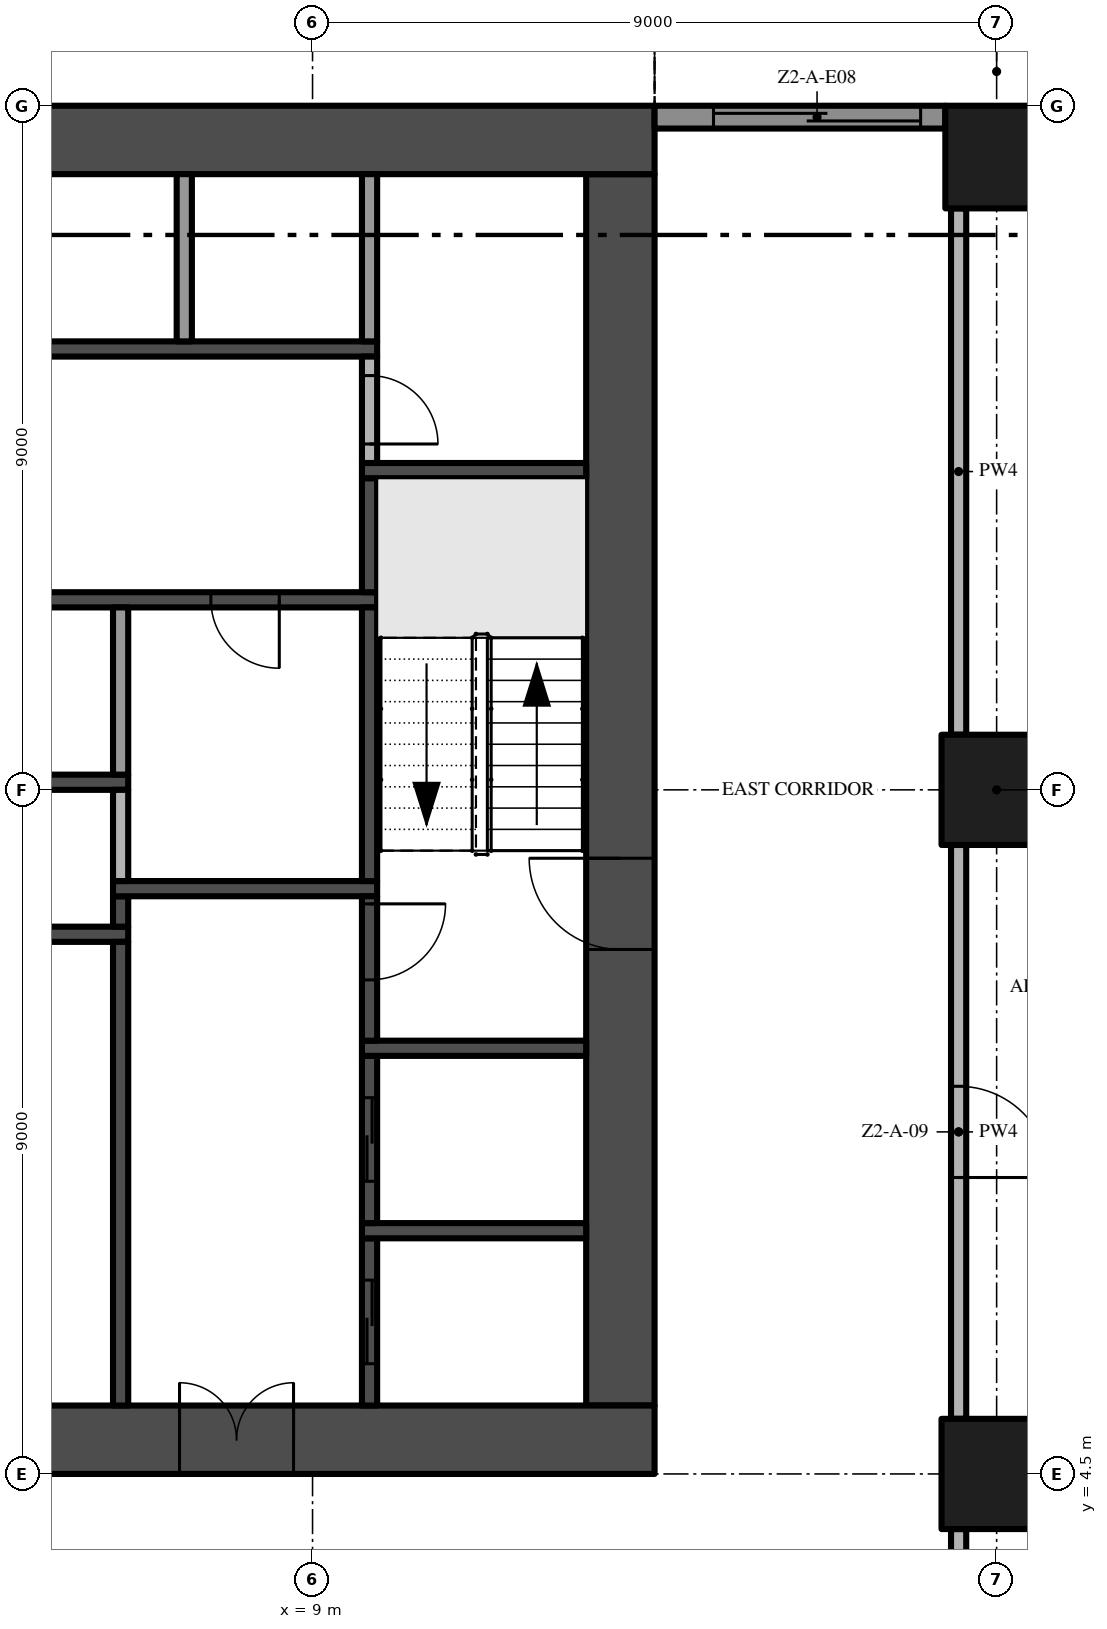
"""IFC4 building model, lengths in metres.
Left out: names, types, materials, properties, quantities, classifications, styles, units other than length and angle.
Written with IfcOpenShell. Run it as: python <this file> out.ifc"""

import sys

from ifc_helpers import new_model, si_unit, direction, frame, frame_2d, origin, origin_2d, place, context, subcontext, project, spatial, polyline, rectangle, outline, extrude, element, fill, save


model = new_model("IFC4")
c1 = context("Model", 3, precision=1e-05, world=origin(), true_north=direction((0.0, 1.0)))
c2 = subcontext(c1, "Body", "Model", "MODEL_VIEW")
j1 = project(units=[si_unit("LENGTHUNIT", "METRE"), si_unit("PLANEANGLEUNIT", "RADIAN")], contexts=[c1])
p1 = place(None, origin())
s1 = spatial("IfcSite", under=j1, at=p1, CompositionType="ELEMENT")
p2 = place(p1, origin())
s2 = spatial("IfcBuilding", under=s1, at=p2, CompositionType="ELEMENT")
p3 = place(p2, frame((0.0, 0.0, 69.4)))
s3 = spatial("IfcBuildingStorey", under=s2, at=p3, CompositionType="ELEMENT", Elevation=69.4)
p4 = place(p3, frame((-13.5, 4.95, -0.3), z_axis=(0.0, 0.0, 1.0), x_axis=(1.0, 0.0, 0.0)))
e1 = element("IfcWall", 1, at=p4, inside=s3, PredefinedType="SHEAR", context=c2, shape_type="SweptSolid", body=[
    extrude(rectangle(XDim=27.0, YDim=0.9, at=frame_2d((13.5, 0.0))), origin(), (0.0, 0.0, 1.0), 3.8),
])
p5 = place(p4, frame((12.0, 0.0, 0.3)))
e2 = element("IfcOpeningElement", 2, at=p5, cuts=e1, PredefinedType="OPENING", context=c2, shape_type="SweptSolid", body=[
    extrude(rectangle(XDim=3.0, YDim=2.4, at=frame_2d((1.5, 1.2))), frame((0.0, 0.46, 0.0), z_axis=(0.0, -1.0, 0.0), x_axis=(1.0, 0.0, 0.0)), (0.0, 0.0, 1.0), 0.92),
])
p6 = place(p4, frame((4.9, 0.0, 0.3)))
e3 = element("IfcOpeningElement", 3, at=p6, cuts=e1, PredefinedType="OPENING", context=c2, shape_type="SweptSolid", body=[
    extrude(rectangle(XDim=1.2, YDim=2.2, at=frame_2d((0.6, 1.1))), frame((0.0, 0.46, 0.0), z_axis=(0.0, -1.0, 0.0), x_axis=(1.0, 0.0, 0.0)), (0.0, 0.0, 1.0), 0.92),
])
p7 = place(p4, frame((20.75, 0.0, 0.3)))
e4 = element("IfcOpeningElement", 4, at=p7, cuts=e1, PredefinedType="OPENING", context=c2, shape_type="SweptSolid", body=[
    extrude(rectangle(XDim=1.5, YDim=2.2, at=frame_2d((0.75, 1.1))), frame((0.0, 0.46, 0.0), z_axis=(0.0, -1.0, 0.0), x_axis=(1.0, 0.0, 0.0)), (0.0, 0.0, 1.0), 0.92),
])
p8 = place(p4, frame((17.4, 0.0, 0.3)))
e5 = element("IfcOpeningElement", 5, at=p8, cuts=e1, PredefinedType="OPENING", context=c2, shape_type="SweptSolid", body=[
    extrude(rectangle(XDim=1.2, YDim=2.2, at=frame_2d((0.6, 1.1))), frame((0.0, 0.46, 0.0), z_axis=(0.0, -1.0, 0.0), x_axis=(1.0, 0.0, 0.0)), (0.0, 0.0, 1.0), 0.92),
])
p9 = place(p3, frame((13.05, 5.4, -0.3), z_axis=(0.0, 0.0, 1.0), x_axis=(0.0, 1.0, 0.0)))
e6 = element("IfcWall", 6, at=p9, inside=s3, PredefinedType="SHEAR", context=c2, shape_type="SweptSolid", body=[
    extrude(rectangle(XDim=16.2, YDim=0.9, at=frame_2d((8.1, 0.0))), origin(), (0.0, 0.0, 1.0), 3.8),
])
p10 = place(p9, frame((6.0, 0.0, 0.3)))
e7 = element("IfcOpeningElement", 7, at=p10, cuts=e6, PredefinedType="OPENING", context=c2, shape_type="SweptSolid", body=[
    extrude(rectangle(XDim=1.2, YDim=2.2, at=frame_2d((0.6, 1.1))), frame((0.0, 0.46, 0.0), z_axis=(0.0, -1.0, 0.0), x_axis=(1.0, 0.0, 0.0)), (0.0, 0.0, 1.0), 0.92),
])
p11 = place(p3, frame((13.5, 22.05, -0.3), z_axis=(0.0, 0.0, 1.0), x_axis=(-1.0, 0.0, 0.0)))
e8 = element("IfcWall", 8, at=p11, inside=s3, PredefinedType="SHEAR", context=c2, shape_type="SweptSolid", body=[
    extrude(rectangle(XDim=27.0, YDim=0.9, at=frame_2d((13.5, 0.0))), origin(), (0.0, 0.0, 1.0), 3.8),
])
p12 = place(p3, frame((18.0, 13.5, 0.0), z_axis=(0.0, 0.0, 1.0), x_axis=(1.0, 0.0, 0.0)))
e9 = element("IfcColumn", 9, at=p12, inside=s3, PredefinedType="COLUMN", context=c2, shape_type="SweptSolid", body=[
    extrude(rectangle(XDim=1.45, YDim=1.45, at=origin_2d()), origin(), (0.0, 0.0, 1.0), 3.5),
])
p13 = place(p3, frame((18.0, 21.825, 0.0), z_axis=(0.0, 0.0, 1.0), x_axis=(1.0, 0.0, 0.0)))
e10 = element("IfcColumn", 10, at=p13, inside=s3, PredefinedType="COLUMN", context=c2, shape_type="SweptSolid", body=[
    extrude(rectangle(XDim=1.35, YDim=1.35, at=origin_2d()), origin(), (0.0, 0.0, 1.0), 3.5),
])
p14 = place(p3, frame((18.0, 4.5, 0.0), z_axis=(0.0, 0.0, 1.0), x_axis=(1.0, 0.0, 0.0)))
e11 = element("IfcColumn", 11, at=p14, inside=s3, PredefinedType="COLUMN", context=c2, shape_type="SweptSolid", body=[
    extrude(rectangle(XDim=1.45, YDim=1.45, at=origin_2d()), origin(), (0.0, 0.0, 1.0), 3.5),
])
p15 = place(p3, frame((13.5, 22.35, 0.0), z_axis=(0.0, 0.0, 1.0), x_axis=(1.0, 0.0, 0.0)))
e12 = element("IfcWall", 12, at=p15, inside=s3, PredefinedType="SOLIDWALL", context=c2, shape_type="SweptSolid", body=[
    extrude(rectangle(XDim=3.825, YDim=0.3, at=frame_2d((1.913, 0.0))), origin(), (0.0, 0.0, 1.0), 3.5),
])
p16 = place(p15, frame((0.775, 0.0, 0.0)))
e13 = element("IfcOpeningElement", 13, at=p16, cuts=e12, PredefinedType="OPENING", context=c2, shape_type="SweptSolid", body=[
    extrude(rectangle(XDim=2.725, YDim=2.4, at=frame_2d((1.363, 1.2))), frame((0.0, 0.16, 0.0), z_axis=(0.0, -1.0, 0.0), x_axis=(1.0, 0.0, 0.0)), (0.0, 0.0, 1.0), 0.32),
])
p17 = place(p3, origin())
e14 = element("IfcWall", 14, at=p17, inside=s3, PredefinedType="USERDEFINED", context=c2, shape_type="SweptSolid", body=[
    extrude(outline(polyline([(22.5, 23.1), (21.0, 23.329), (19.5, 23.929), (18.0, 24.671), (16.5, 25.271), (15.0, 25.5), (13.5, 25.271), (13.538, 25.024), (15.0, 25.247), (16.434, 25.028), (17.898, 24.442), (19.398, 23.701), (20.934, 23.086), (22.462, 22.853), (22.5, 23.1)])), origin(), (0.0, 0.0, 1.0), 0.9),
])
p18 = place(p3, frame((-9.85, 19.3, 0.0), z_axis=(0.0, 0.0, 1.0), x_axis=(1.0, 0.0, 0.0)))
e15 = element("IfcWall", 15, at=p18, inside=s3, PredefinedType="SHEAR", context=c2, shape_type="SweptSolid", body=[
    extrude(rectangle(XDim=19.7, YDim=0.2, at=frame_2d((9.85, 0.0))), origin(), (0.0, 0.0, 1.0), 3.5),
])
p19 = place(p18, frame((0.769, 0.0, 0.0)))
e16 = element("IfcOpeningElement", 16, at=p19, cuts=e15, PredefinedType="OPENING", context=c2, shape_type="SweptSolid", body=[
    extrude(rectangle(XDim=1.1, YDim=2.1, at=frame_2d((0.55, 1.05))), frame((0.0, 0.11, 0.0), z_axis=(0.0, -1.0, 0.0), x_axis=(1.0, 0.0, 0.0)), (0.0, 0.0, 1.0), 0.22),
])
p20 = place(p18, frame((3.206, 0.0, 0.0)))
e17 = element("IfcOpeningElement", 17, at=p20, cuts=e15, PredefinedType="OPENING", context=c2, shape_type="SweptSolid", body=[
    extrude(rectangle(XDim=1.1, YDim=2.1, at=frame_2d((0.55, 1.05))), frame((0.0, 0.11, 0.0), z_axis=(0.0, -1.0, 0.0), x_axis=(1.0, 0.0, 0.0)), (0.0, 0.0, 1.0), 0.22),
])
p21 = place(p18, frame((5.644, 0.0, 0.0)))
e18 = element("IfcOpeningElement", 18, at=p21, cuts=e15, PredefinedType="OPENING", context=c2, shape_type="SweptSolid", body=[
    extrude(rectangle(XDim=1.1, YDim=2.1, at=frame_2d((0.55, 1.05))), frame((0.0, 0.11, 0.0), z_axis=(0.0, -1.0, 0.0), x_axis=(1.0, 0.0, 0.0)), (0.0, 0.0, 1.0), 0.22),
])
p22 = place(p18, frame((8.081, 0.0, 0.0)))
e19 = element("IfcOpeningElement", 19, at=p22, cuts=e15, PredefinedType="OPENING", context=c2, shape_type="SweptSolid", body=[
    extrude(rectangle(XDim=1.1, YDim=2.1, at=frame_2d((0.55, 1.05))), frame((0.0, 0.11, 0.0), z_axis=(0.0, -1.0, 0.0), x_axis=(1.0, 0.0, 0.0)), (0.0, 0.0, 1.0), 0.22),
])
for number, where, z_axis, x_axis in (
    (20, (1.5, 11.6, 0.0), (0.0, 0.0, 1.0), (1.0, 0.0, 0.0)),
    (21, (1.5, 13.6, 0.0), (0.0, 0.0, 1.0), (1.0, 0.0, 0.0)),
):
    element("IfcWall", number, at=place(p3, frame(where, z_axis=z_axis, x_axis=x_axis)), inside=s3, PredefinedType="SHEAR", context=c2, shape_type="SweptSolid", body=[
        extrude(rectangle(XDim=5.075, YDim=0.2, at=frame_2d((2.538, 0.0))), origin(), (0.0, 0.0, 1.0), 3.5),
    ])
p23 = place(p3, frame((9.85, 16.0, 0.0), z_axis=(0.0, 0.0, 1.0), x_axis=(-1.0, 0.0, 0.0)))
e22 = element("IfcWall", 22, at=p23, inside=s3, PredefinedType="SHEAR", context=c2, shape_type="SweptSolid", body=[
    extrude(rectangle(XDim=8.35, YDim=0.2, at=frame_2d((4.175, 0.0))), origin(), (0.0, 0.0, 1.0), 3.5),
])
p24 = place(p23, frame((1.288, 0.0, 0.0)))
e23 = element("IfcOpeningElement", 23, at=p24, cuts=e22, PredefinedType="OPENING", context=c2, shape_type="SweptSolid", body=[
    extrude(rectangle(XDim=0.9, YDim=2.1, at=frame_2d((0.45, 1.05))), frame((0.0, 0.11, 0.0), z_axis=(0.0, -1.0, 0.0), x_axis=(1.0, 0.0, 0.0)), (0.0, 0.0, 1.0), 0.22),
])
p25 = place(p3, frame((6.475, 5.4, 0.0), z_axis=(0.0, 0.0, 1.0), x_axis=(0.0, 1.0, 0.0)))
e24 = element("IfcWall", 24, at=p25, inside=s3, PredefinedType="SHEAR", context=c2, shape_type="SweptSolid", body=[
    extrude(rectangle(XDim=6.1, YDim=0.2, at=frame_2d((3.05, 0.0))), origin(), (0.0, 0.0, 1.0), 3.5),
])
p26 = place(p3, frame((6.475, 11.7, 0.0), z_axis=(0.0, 0.0, 1.0), x_axis=(0.0, 1.0, 0.0)))
e25 = element("IfcWall", 25, at=p26, inside=s3, PredefinedType="SHEAR", context=c2, shape_type="SweptSolid", body=[
    extrude(rectangle(XDim=0.4, YDim=0.2, at=frame_2d((0.2, 0.0))), origin(), (0.0, 0.0, 1.0), 3.5),
])
p27 = place(p3, frame((6.375, 12.2, 0.0), z_axis=(0.0, 0.0, 1.0), x_axis=(1.0, 0.0, 0.0)))
e26 = element("IfcWall", 26, at=p27, inside=s3, PredefinedType="SHEAR", context=c2, shape_type="SweptSolid", body=[
    extrude(rectangle(XDim=3.475, YDim=0.2, at=frame_2d((1.738, 0.0))), origin(), (0.0, 0.0, 1.0), 3.5),
])
p28 = place(p3, frame((6.475, 12.3, 0.0), z_axis=(0.0, 0.0, 1.0), x_axis=(0.0, 1.0, 0.0)))
e27 = element("IfcWall", 27, at=p28, inside=s3, PredefinedType="PARTITIONING", context=c2, shape_type="SweptSolid", body=[
    extrude(rectangle(XDim=1.2, YDim=0.2, at=frame_2d((0.6, 0.0))), origin(), (0.0, 0.0, 1.0), 3.5),
])
for number, where, z_axis, x_axis in (
    (28, (6.475, 13.7, 0.0), (0.0, 0.0, 1.0), (0.0, 1.0, 0.0)),
    (29, (7.312, 19.4, 0.0), (0.0, 0.0, 1.0), (0.0, 1.0, 0.0)),
):
    element("IfcWall", number, at=place(p3, frame(where, z_axis=z_axis, x_axis=x_axis)), inside=s3, PredefinedType="PARTITIONING", context=c2, shape_type="SweptSolid", body=[
        extrude(rectangle(XDim=2.2, YDim=0.2, at=frame_2d((1.1, 0.0))), origin(), (0.0, 0.0, 1.0), 3.5),
    ])
p29 = place(p3, frame((9.75, 5.4, 0.0), z_axis=(0.0, 0.0, 1.0), x_axis=(0.0, 1.0, 0.0)))
e30 = element("IfcWall", 30, at=p29, inside=s3, PredefinedType="SHEAR", context=c2, shape_type="SweptSolid", body=[
    extrude(rectangle(XDim=2.2, YDim=0.2, at=frame_2d((1.1, 0.0))), origin(), (0.0, 0.0, 1.0), 3.5),
])
p30 = place(p29, frame((0.55, 0.0, 0.0)))
e31 = element("IfcOpeningElement", 31, at=p30, cuts=e30, PredefinedType="OPENING", context=c2, shape_type="SweptSolid", body=[
    extrude(rectangle(XDim=1.1, YDim=2.1, at=frame_2d((0.55, 1.05))), frame((0.0, 0.11, 0.0), z_axis=(0.0, -1.0, 0.0), x_axis=(1.0, 0.0, 0.0)), (0.0, 0.0, 1.0), 0.22),
])
p31 = place(p3, frame((9.65, 7.7, 0.0), z_axis=(0.0, 0.0, 1.0), x_axis=(1.0, 0.0, 0.0)))
e32 = element("IfcWall", 32, at=p31, inside=s3, PredefinedType="SHEAR", context=c2, shape_type="SweptSolid", body=[
    extrude(rectangle(XDim=2.95, YDim=0.2, at=frame_2d((1.475, 0.0))), origin(), (0.0, 0.0, 1.0), 3.5),
])
p32 = place(p3, frame((9.75, 7.8, 0.0), z_axis=(0.0, 0.0, 1.0), x_axis=(0.0, 1.0, 0.0)))
e33 = element("IfcWall", 33, at=p32, inside=s3, PredefinedType="SHEAR", context=c2, shape_type="SweptSolid", body=[
    extrude(rectangle(XDim=2.2, YDim=0.2, at=frame_2d((1.1, 0.0))), origin(), (0.0, 0.0, 1.0), 3.5),
])
p33 = place(p32, frame((0.55, 0.0, 0.0)))
e34 = element("IfcOpeningElement", 34, at=p33, cuts=e33, PredefinedType="OPENING", context=c2, shape_type="SweptSolid", body=[
    extrude(rectangle(XDim=1.1, YDim=2.1, at=frame_2d((0.55, 1.05))), frame((0.0, 0.11, 0.0), z_axis=(0.0, -1.0, 0.0), x_axis=(1.0, 0.0, 0.0)), (0.0, 0.0, 1.0), 0.22),
])
p34 = place(p3, frame((9.65, 10.1, 0.0), z_axis=(0.0, 0.0, 1.0), x_axis=(1.0, 0.0, 0.0)))
e35 = element("IfcWall", 35, at=p34, inside=s3, PredefinedType="SHEAR", context=c2, shape_type="SweptSolid", body=[
    extrude(rectangle(XDim=2.95, YDim=0.2, at=frame_2d((1.475, 0.0))), origin(), (0.0, 0.0, 1.0), 3.5),
])
p35 = place(p3, frame((9.75, 12.1, 0.0), z_axis=(0.0, 0.0, 1.0), x_axis=(0.0, -1.0, 0.0)))
e36 = element("IfcWall", 36, at=p35, inside=s3, PredefinedType="SHEAR", context=c2, shape_type="SweptSolid", body=[
    extrude(rectangle(XDim=1.9, YDim=0.2, at=frame_2d((0.95, 0.0))), origin(), (0.0, 0.0, 1.0), 3.5),
])
p36 = place(p35, frame((0.1, 0.0, 0.0)))
e37 = element("IfcOpeningElement", 37, at=p36, cuts=e36, PredefinedType="OPENING", context=c2, shape_type="SweptSolid", body=[
    extrude(rectangle(XDim=1.0, YDim=2.2, at=frame_2d((0.5, 1.1))), frame((0.0, 0.11, 0.0), z_axis=(0.0, -1.0, 0.0), x_axis=(1.0, 0.0, 0.0)), (0.0, 0.0, 1.0), 0.22),
])
p37 = place(p3, frame((9.75, 12.3, 0.0), z_axis=(0.0, 0.0, 1.0), x_axis=(0.0, 1.0, 0.0)))
e38 = element("IfcWall", 38, at=p37, inside=s3, PredefinedType="SHEAR", context=c2, shape_type="SweptSolid", body=[
    extrude(rectangle(XDim=3.6, YDim=0.2, at=frame_2d((1.8, 0.0))), origin(), (0.0, 0.0, 1.0), 3.5),
])
p38 = place(p3, frame((9.75, 16.1, 0.0), z_axis=(0.0, 0.0, 1.0), x_axis=(0.0, 1.0, 0.0)))
e39 = element("IfcWall", 39, at=p38, inside=s3, PredefinedType="SHEAR", context=c2, shape_type="SweptSolid", body=[
    extrude(rectangle(XDim=1.5, YDim=0.2, at=frame_2d((0.75, 0.0))), origin(), (0.0, 0.0, 1.0), 3.5),
])
p39 = place(p3, frame((9.65, 17.7, 0.0), z_axis=(0.0, 0.0, 1.0), x_axis=(1.0, 0.0, 0.0)))
e40 = element("IfcWall", 40, at=p39, inside=s3, PredefinedType="SHEAR", context=c2, shape_type="SweptSolid", body=[
    extrude(rectangle(XDim=2.95, YDim=0.2, at=frame_2d((1.475, 0.0))), origin(), (0.0, 0.0, 1.0), 3.5),
])
p40 = place(p3, frame((9.75, 19.2, 0.0), z_axis=(0.0, 0.0, 1.0), x_axis=(0.0, -1.0, 0.0)))
e41 = element("IfcWall", 41, at=p40, inside=s3, PredefinedType="PARTITIONING", context=c2, shape_type="SweptSolid", body=[
    extrude(rectangle(XDim=1.4, YDim=0.2, at=frame_2d((0.7, 0.0))), origin(), (0.0, 0.0, 1.0), 3.5),
])
p41 = place(p40, frame((0.25, 0.0, 0.0)))
e42 = element("IfcOpeningElement", 42, at=p41, cuts=e41, PredefinedType="OPENING", context=c2, shape_type="SweptSolid", body=[
    extrude(rectangle(XDim=0.9, YDim=2.1, at=frame_2d((0.45, 1.05))), frame((0.0, 0.11, 0.0), z_axis=(0.0, -1.0, 0.0), x_axis=(1.0, 0.0, 0.0)), (0.0, 0.0, 1.0), 0.22),
])
p42 = place(p3, frame((9.75, 19.4, 0.0), z_axis=(0.0, 0.0, 1.0), x_axis=(0.0, 1.0, 0.0)))
e43 = element("IfcWall", 43, at=p42, inside=s3, PredefinedType="PARTITIONING", context=c2, shape_type="SweptSolid", body=[
    extrude(rectangle(XDim=2.2, YDim=0.2, at=frame_2d((1.1, 0.0))), origin(), (0.0, 0.0, 1.0), 3.5),
])
p43 = place(p3, frame((17.5, -0.2, 0.0), z_axis=(0.0, 0.0, 1.0), x_axis=(0.0, 1.0, 0.0)))
e44 = element("IfcWall", 44, at=p43, inside=s3, PredefinedType="PARTITIONING", context=c2, shape_type="SweptSolid", body=[
    extrude(rectangle(XDim=3.975, YDim=0.2, at=frame_2d((1.988, 0.0))), origin(), (0.0, 0.0, 1.0), 3.5),
])
p44 = place(p3, frame((17.5, 12.775, 0.0), z_axis=(0.0, 0.0, 1.0), x_axis=(0.0, -1.0, 0.0)))
e45 = element("IfcWall", 45, at=p44, inside=s3, PredefinedType="PARTITIONING", context=c2, shape_type="SweptSolid", body=[
    extrude(rectangle(XDim=7.55, YDim=0.2, at=frame_2d((3.775, 0.0))), origin(), (0.0, 0.0, 1.0), 3.5),
])
p45 = place(p44, frame((3.175, 0.0, 0.0)))
e46 = element("IfcOpeningElement", 46, at=p45, cuts=e45, PredefinedType="OPENING", context=c2, shape_type="SweptSolid", body=[
    extrude(rectangle(XDim=1.2, YDim=2.4, at=frame_2d((0.6, 1.2))), frame((0.0, 0.11, 0.0), z_axis=(0.0, -1.0, 0.0), x_axis=(1.0, 0.0, 0.0)), (0.0, 0.0, 1.0), 0.22),
])
p46 = place(p3, frame((17.5, 14.225, 0.0), z_axis=(0.0, 0.0, 1.0), x_axis=(0.0, 1.0, 0.0)))
e47 = element("IfcWall", 47, at=p46, inside=s3, PredefinedType="PARTITIONING", context=c2, shape_type="SweptSolid", body=[
    extrude(rectangle(XDim=6.925, YDim=0.2, at=frame_2d((3.462, 0.0))), origin(), (0.0, 0.0, 1.0), 3.5),
])
p47 = place(p16, origin())
e48 = element("IfcDoor", 48, at=p47, inside=s3, OperationType="SINGLE_SWING_LEFT", PredefinedType="DOOR", context=c2, shape_type="SweptSolid", body=[
    extrude(rectangle(XDim=2.725, YDim=2.4, at=frame_2d((1.363, 1.2))), frame((0.0, 0.025, 0.0), z_axis=(0.0, -1.0, 0.0), x_axis=(1.0, 0.0, 0.0)), (0.0, 0.0, 1.0), 0.05),
])
fill(e13, e48)
p48 = place(p10, frame((1.2, 0.0, 0.0), z_axis=(0.0, 0.0, 1.0), x_axis=(-1.0, 0.0, 0.0)))
e49 = element("IfcDoor", 49, at=p48, inside=s3, OperationType="SINGLE_SWING_LEFT", PredefinedType="DOOR", context=c2, shape_type="SweptSolid", body=[
    extrude(rectangle(XDim=1.2, YDim=2.2, at=frame_2d((0.6, 1.1))), frame((0.0, 0.025, 0.0), z_axis=(0.0, -1.0, 0.0), x_axis=(1.0, 0.0, 0.0)), (0.0, 0.0, 1.0), 0.05),
])
fill(e7, e49)
p49 = place(p7, frame((1.5, 0.0, 0.0), z_axis=(0.0, 0.0, 1.0), x_axis=(-1.0, 0.0, 0.0)))
e50 = element("IfcDoor", 50, at=p49, inside=s3, OperationType="DOUBLE_DOOR_SINGLE_SWING", PredefinedType="DOOR", context=c2, shape_type="SweptSolid", body=[
    extrude(rectangle(XDim=1.5, YDim=2.2, at=frame_2d((0.75, 1.1))), frame((0.0, 0.025, 0.0), z_axis=(0.0, -1.0, 0.0), x_axis=(1.0, 0.0, 0.0)), (0.0, 0.0, 1.0), 0.05),
])
fill(e4, e50)
p50 = place(p36, origin())
e51 = element("IfcDoor", 51, at=p50, inside=s3, OperationType="SINGLE_SWING_LEFT", PredefinedType="DOOR", context=c2, shape_type="SweptSolid", body=[
    extrude(rectangle(XDim=1.0, YDim=2.2, at=frame_2d((0.5, 1.1))), frame((0.0, 0.025, 0.0), z_axis=(0.0, -1.0, 0.0), x_axis=(1.0, 0.0, 0.0)), (0.0, 0.0, 1.0), 0.05),
])
fill(e37, e51)
p51 = place(p30, origin())
e52 = element("IfcDoor", 52, at=p51, inside=s3, OperationType="SLIDING_TO_RIGHT", PredefinedType="DOOR", context=c2, shape_type="SweptSolid", body=[
    extrude(rectangle(XDim=1.1, YDim=2.1, at=frame_2d((0.55, 1.05))), frame((0.0, 0.025, 0.0), z_axis=(0.0, -1.0, 0.0), x_axis=(1.0, 0.0, 0.0)), (0.0, 0.0, 1.0), 0.05),
])
fill(e31, e52)
p52 = place(p33, origin())
e53 = element("IfcDoor", 53, at=p52, inside=s3, OperationType="SLIDING_TO_RIGHT", PredefinedType="DOOR", context=c2, shape_type="SweptSolid", body=[
    extrude(rectangle(XDim=1.1, YDim=2.1, at=frame_2d((0.55, 1.05))), frame((0.0, 0.025, 0.0), z_axis=(0.0, -1.0, 0.0), x_axis=(1.0, 0.0, 0.0)), (0.0, 0.0, 1.0), 0.05),
])
fill(e34, e53)
p53 = place(p24, origin())
e54 = element("IfcDoor", 54, at=p53, inside=s3, OperationType="SINGLE_SWING_LEFT", PredefinedType="DOOR", context=c2, shape_type="SweptSolid", body=[
    extrude(rectangle(XDim=0.9, YDim=2.1, at=frame_2d((0.45, 1.05))), frame((0.0, 0.025, 0.0), z_axis=(0.0, -1.0, 0.0), x_axis=(1.0, 0.0, 0.0)), (0.0, 0.0, 1.0), 0.05),
])
fill(e23, e54)
p54 = place(p41, origin())
e55 = element("IfcDoor", 55, at=p54, inside=s3, OperationType="SINGLE_SWING_RIGHT", PredefinedType="DOOR", context=c2, shape_type="SweptSolid", body=[
    extrude(rectangle(XDim=0.9, YDim=2.1, at=frame_2d((0.45, 1.05))), frame((0.0, 0.025, 0.0), z_axis=(0.0, -1.0, 0.0), x_axis=(1.0, 0.0, 0.0)), (0.0, 0.0, 1.0), 0.05),
])
fill(e42, e55)
p55 = place(p45, origin())
e56 = element("IfcDoor", 56, at=p55, inside=s3, OperationType="SINGLE_SWING_RIGHT", PredefinedType="DOOR", context=c2, shape_type="SweptSolid", body=[
    extrude(rectangle(XDim=1.2, YDim=2.4, at=frame_2d((0.6, 1.2))), frame((0.0, 0.025, 0.0), z_axis=(0.0, -1.0, 0.0), x_axis=(1.0, 0.0, 0.0)), (0.0, 0.0, 1.0), 0.05),
])
fill(e46, e56)
save(model, sys.argv[1])
